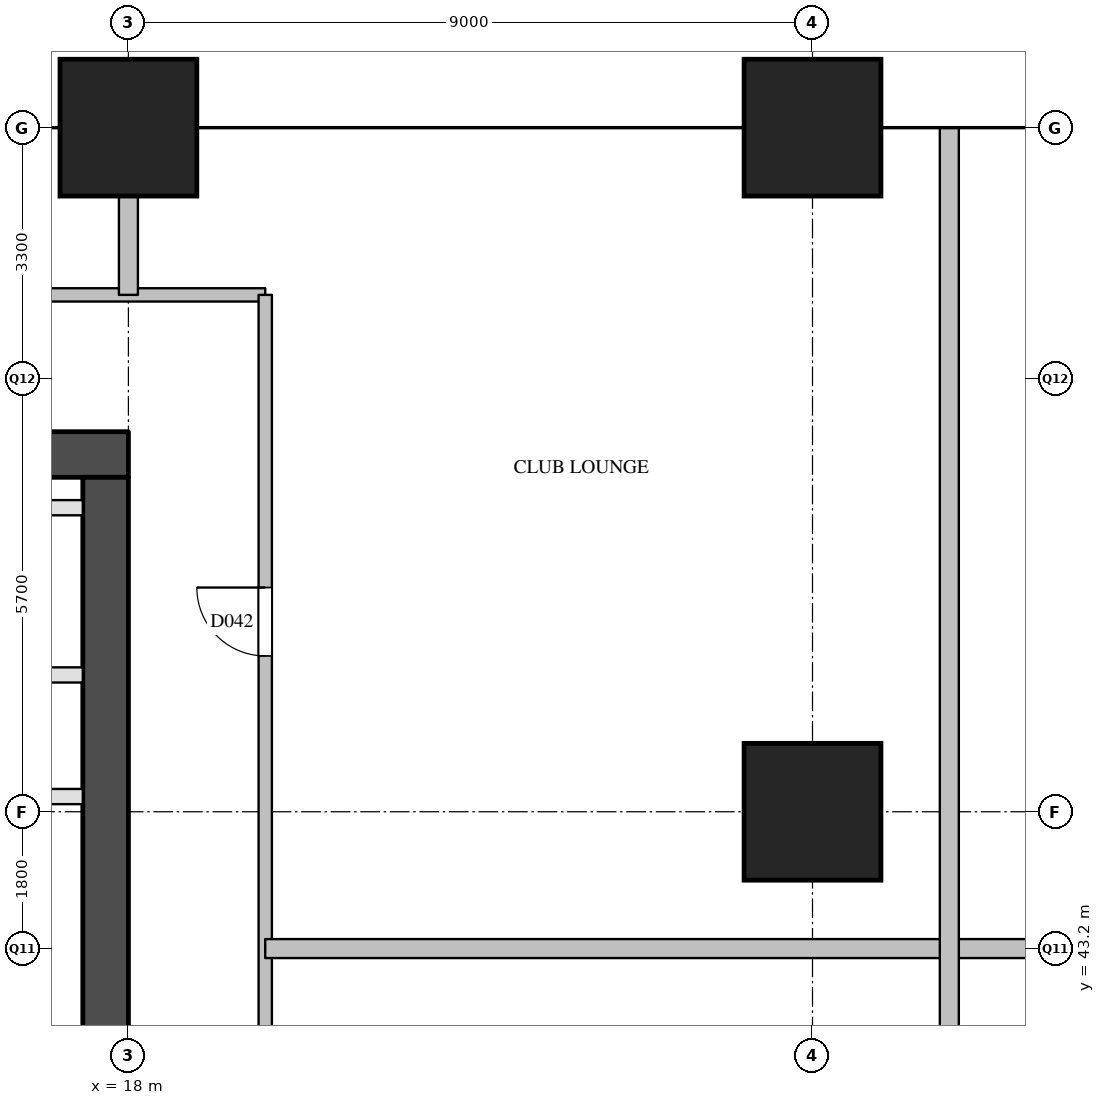
"""IFC4 building model, lengths in metres.
Left out: names, types, materials, properties, quantities, classifications, styles, units other than length and angle.
Written with IfcOpenShell. Run it as: python <this file> out.ifc"""

import sys

from ifc_helpers import new_model, si_unit, direction, frame, frame_2d, origin, origin_2d, place, context, subcontext, project, spatial, rectangle, extrude, element, fill, save


model = new_model("IFC4")
c1 = context("Model", 3, precision=1e-05, world=origin(), true_north=direction((0.0, 1.0)))
c2 = subcontext(c1, "Body", "Model", "MODEL_VIEW")
j1 = project(units=[si_unit("LENGTHUNIT", "METRE"), si_unit("PLANEANGLEUNIT", "RADIAN")], contexts=[c1])
p1 = place(None, origin())
s1 = spatial("IfcSite", under=j1, at=p1, CompositionType="ELEMENT")
p2 = place(p1, origin())
s2 = spatial("IfcBuilding", under=s1, at=p2, CompositionType="ELEMENT")
p3 = place(p2, frame((0.0, 0.0, 57.6)))
s3 = spatial("IfcBuildingStorey", under=s2, at=p3, CompositionType="ELEMENT", Elevation=57.6)
for number, where, z_axis, x_axis in (
    (1, (18.0, 54.0, 0.0), (0.0, 0.0, 1.0), (1.0, 0.0, 0.0)),
    (2, (27.0, 45.0, 0.0), (0.0, 0.0, 1.0), (1.0, 0.0, 0.0)),
    (3, (27.0, 54.0, 0.0), (0.0, 0.0, 1.0), (1.0, 0.0, 0.0)),
):
    element("IfcColumn", number, at=place(p3, frame(where, z_axis=z_axis, x_axis=x_axis)), inside=s3, PredefinedType="COLUMN", context=c2, shape_type="SweptSolid", body=[
        extrude(rectangle(XDim=1.8, YDim=1.8, at=origin_2d()), origin(), (0.0, 0.0, 1.0), 3.8),
    ])
p4 = place(p3, frame((5.6, 49.7, 0.0), z_axis=(0.0, 0.0, 1.0), x_axis=(1.0, 0.0, 0.0)))
e4 = element("IfcWall", 4, at=p4, inside=s3, PredefinedType="SHEAR", context=c2, shape_type="SweptSolid", body=[
    extrude(rectangle(XDim=12.4, YDim=0.6, at=frame_2d((6.2, 0.0))), origin(), (0.0, 0.0, 1.0), 3.5),
])
p5 = place(p3, frame((17.7, 29.1, 0.0), z_axis=(0.0, 0.0, 1.0), x_axis=(0.0, 1.0, 0.0)))
e5 = element("IfcWall", 5, at=p5, inside=s3, PredefinedType="SHEAR", context=c2, shape_type="SweptSolid", body=[
    extrude(rectangle(XDim=20.3, YDim=0.6, at=frame_2d((10.15, 0.0))), origin(), (0.0, 0.0, 1.0), 3.5),
])
p6 = place(p5, frame((1.25, 0.0, 0.0)))
e6 = element("IfcOpeningElement", 6, at=p6, cuts=e5, PredefinedType="OPENING", context=c2, shape_type="SweptSolid", body=[
    extrude(rectangle(XDim=0.7, YDim=2.1, at=frame_2d((0.35, 1.05))), frame((0.0, 0.31, 0.0), z_axis=(0.0, -1.0, 0.0), x_axis=(1.0, 0.0, 0.0)), (0.0, 0.0, 1.0), 0.62),
])
p7 = place(p5, frame((7.05, 0.0, 0.0)))
e7 = element("IfcOpeningElement", 7, at=p7, cuts=e5, PredefinedType="OPENING", context=c2, shape_type="SweptSolid", body=[
    extrude(rectangle(XDim=0.7, YDim=2.1, at=frame_2d((0.35, 1.05))), frame((0.0, 0.31, 0.0), z_axis=(0.0, -1.0, 0.0), x_axis=(1.0, 0.0, 0.0)), (0.0, 0.0, 1.0), 0.62),
])
p8 = place(p3, frame((12.5, 45.2, 0.0), z_axis=(0.0, 0.0, 1.0), x_axis=(1.0, 0.0, 0.0)))
e8 = element("IfcWall", 8, at=p8, inside=s3, PredefinedType="PARTITIONING", context=c2, shape_type="SweptSolid", body=[
    extrude(rectangle(XDim=4.9, YDim=0.2, at=frame_2d((2.45, 0.0))), origin(), (0.0, 0.0, 1.0), 3.5),
])
p9 = place(p8, frame((0.897, 0.0, 0.0)))
e9 = element("IfcOpeningElement", 9, at=p9, cuts=e8, PredefinedType="OPENING", context=c2, shape_type="SweptSolid", body=[
    extrude(rectangle(XDim=0.9, YDim=2.1, at=frame_2d((0.45, 1.05))), frame((0.0, 0.11, 0.0), z_axis=(0.0, -1.0, 0.0), x_axis=(1.0, 0.0, 0.0)), (0.0, 0.0, 1.0), 0.22),
])
p10 = place(p8, frame((3.347, 0.0, 0.0)))
e10 = element("IfcOpeningElement", 10, at=p10, cuts=e8, PredefinedType="OPENING", context=c2, shape_type="SweptSolid", body=[
    extrude(rectangle(XDim=0.9, YDim=2.1, at=frame_2d((0.45, 1.05))), frame((0.0, 0.11, 0.0), z_axis=(0.0, -1.0, 0.0), x_axis=(1.0, 0.0, 0.0)), (0.0, 0.0, 1.0), 0.22),
])
p11 = place(p3, frame((6.2, 46.8, 0.0), z_axis=(0.0, 0.0, 1.0), x_axis=(1.0, 0.0, 0.0)))
e11 = element("IfcWall", 11, at=p11, inside=s3, PredefinedType="PARTITIONING", context=c2, shape_type="SweptSolid", body=[
    extrude(rectangle(XDim=11.2, YDim=0.2, at=frame_2d((5.6, 0.0))), origin(), (0.0, 0.0, 1.0), 3.5),
])
p12 = place(p11, frame((5.15, 0.0, 0.0)))
e12 = element("IfcOpeningElement", 12, at=p12, cuts=e11, PredefinedType="OPENING", context=c2, shape_type="SweptSolid", body=[
    extrude(rectangle(XDim=0.9, YDim=2.1, at=frame_2d((0.45, 1.05))), frame((0.0, 0.11, 0.0), z_axis=(0.0, -1.0, 0.0), x_axis=(1.0, 0.0, 0.0)), (0.0, 0.0, 1.0), 0.22),
])
p13 = place(p3, frame((6.2, 49.0, 0.0), z_axis=(0.0, 0.0, 1.0), x_axis=(1.0, 0.0, 0.0)))
e13 = element("IfcWall", 13, at=p13, inside=s3, PredefinedType="PARTITIONING", context=c2, shape_type="SweptSolid", body=[
    extrude(rectangle(XDim=11.2, YDim=0.2, at=frame_2d((5.6, 0.0))), origin(), (0.0, 0.0, 1.0), 3.5),
])
p14 = place(p3, frame((3.8, 51.8, 0.0), z_axis=(0.0, 0.0, 1.0), x_axis=(1.0, 0.0, 0.0)))
e14 = element("IfcWall", 14, at=p14, inside=s3, PredefinedType="PARTITIONING", context=c2, shape_type="SweptSolid", body=[
    extrude(rectangle(XDim=16.0, YDim=0.175, at=frame_2d((8.0, 0.0))), origin(), (0.0, 0.0, 1.0), 3.5),
])
p15 = place(p14, frame((7.811, 0.0, 0.0)))
e15 = element("IfcOpeningElement", 15, at=p15, cuts=e14, PredefinedType="OPENING", context=c2, shape_type="SweptSolid", body=[
    extrude(rectangle(XDim=0.9, YDim=2.1, at=frame_2d((0.45, 1.05))), frame((0.0, 0.097, 0.0), z_axis=(0.0, -1.0, 0.0), x_axis=(1.0, 0.0, 0.0)), (0.0, 0.0, 1.0), 0.195),
])
p16 = place(p3, frame((19.8, 29.12, 0.0), z_axis=(0.0, 0.0, 1.0), x_axis=(0.0, 1.0, 0.0)))
e16 = element("IfcWall", 16, at=p16, inside=s3, PredefinedType="PARTITIONING", context=c2, shape_type="SweptSolid", body=[
    extrude(rectangle(XDim=22.68, YDim=0.175, at=frame_2d((11.34, 0.0))), origin(), (0.0, 0.0, 1.0), 3.5),
])
p17 = place(p16, frame((1.14, 0.0, 0.0)))
e17 = element("IfcOpeningElement", 17, at=p17, cuts=e16, PredefinedType="OPENING", context=c2, shape_type="SweptSolid", body=[
    extrude(rectangle(XDim=1.0, YDim=2.1, at=frame_2d((0.5, 1.05))), frame((0.0, 0.097, 0.0), z_axis=(0.0, -1.0, 0.0), x_axis=(1.0, 0.0, 0.0)), (0.0, 0.0, 1.0), 0.195),
])
p18 = place(p16, frame((4.63, 0.0, 0.0)))
e18 = element("IfcOpeningElement", 18, at=p18, cuts=e16, PredefinedType="OPENING", context=c2, shape_type="SweptSolid", body=[
    extrude(rectangle(XDim=0.9, YDim=2.1, at=frame_2d((0.45, 1.05))), frame((0.0, 0.097, 0.0), z_axis=(0.0, -1.0, 0.0), x_axis=(1.0, 0.0, 0.0)), (0.0, 0.0, 1.0), 0.195),
])
p19 = place(p16, frame((9.98, 0.0, 0.0)))
e19 = element("IfcOpeningElement", 19, at=p19, cuts=e16, PredefinedType="OPENING", context=c2, shape_type="SweptSolid", body=[
    extrude(rectangle(XDim=1.0, YDim=2.1, at=frame_2d((0.5, 1.05))), frame((0.0, 0.097, 0.0), z_axis=(0.0, -1.0, 0.0), x_axis=(1.0, 0.0, 0.0)), (0.0, 0.0, 1.0), 0.195),
])
p20 = place(p16, frame((17.93, 0.0, 0.0)))
e20 = element("IfcOpeningElement", 20, at=p20, cuts=e16, PredefinedType="OPENING", context=c2, shape_type="SweptSolid", body=[
    extrude(rectangle(XDim=0.9, YDim=2.1, at=frame_2d((0.45, 1.05))), frame((0.0, 0.097, 0.0), z_axis=(0.0, -1.0, 0.0), x_axis=(1.0, 0.0, 0.0)), (0.0, 0.0, 1.0), 0.195),
])
p21 = place(p3, frame((19.8, 43.2, 0.0), z_axis=(0.0, 0.0, 1.0), x_axis=(1.0, 0.0, 0.0)))
e21 = element("IfcWall", 21, at=p21, inside=s3, PredefinedType="PARTITIONING", context=c2, shape_type="SweptSolid", body=[
    extrude(rectangle(XDim=14.4, YDim=0.25, at=frame_2d((7.2, 0.0))), origin(), (0.0, 0.0, 1.0), 2.5),
])
p22 = place(p3, frame((18.0, 51.8, 0.0), z_axis=(0.0, 0.0, 1.0), x_axis=(0.0, 1.0, 0.0)))
e22 = element("IfcWall", 22, at=p22, inside=s3, PredefinedType="PARTITIONING", context=c2, shape_type="SweptSolid", body=[
    extrude(rectangle(XDim=2.2, YDim=0.25, at=frame_2d((1.1, 0.0))), origin(), (0.0, 0.0, 1.0), 3.5),
])
p23 = place(p3, frame((28.8, 21.6, 0.0), z_axis=(0.0, 0.0, 1.0), x_axis=(0.0, 1.0, 0.0)))
e23 = element("IfcWall", 23, at=p23, inside=s3, PredefinedType="PARTITIONING", context=c2, shape_type="SweptSolid", body=[
    extrude(rectangle(XDim=32.4, YDim=0.25, at=frame_2d((16.2, 0.0))), origin(), (0.0, 0.0, 1.0), 2.5),
])
p24 = place(p20, origin())
e24 = element("IfcDoor", 24, at=p24, inside=s3, OperationType="SINGLE_SWING_RIGHT", PredefinedType="DOOR", context=c2, shape_type="SweptSolid", body=[
    extrude(rectangle(XDim=0.9, YDim=2.1, at=frame_2d((0.45, 1.05))), frame((0.0, 0.025, 0.0), z_axis=(0.0, -1.0, 0.0), x_axis=(1.0, 0.0, 0.0)), (0.0, 0.0, 1.0), 0.05),
])
fill(e20, e24)
save(model, sys.argv[1])
